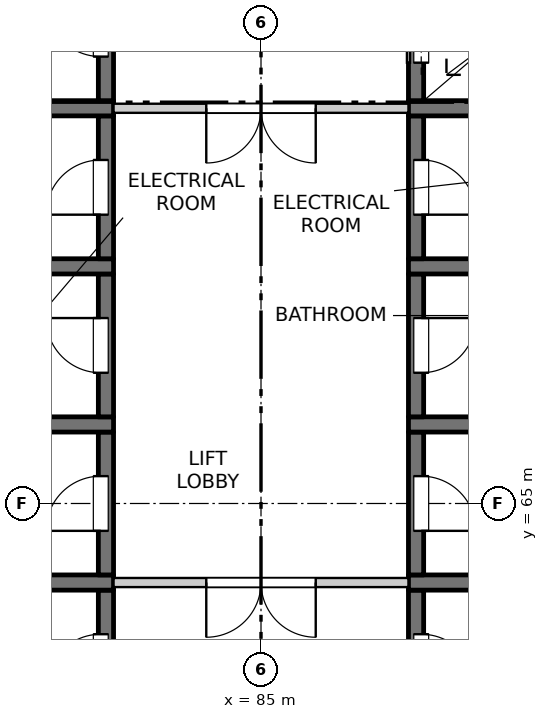
"""IFC4 building model, lengths in metres.
Left out: names, types, materials, properties, quantities, classifications, styles, units other than length and angle.
Written with IfcOpenShell. Run it as: python <this file> out.ifc"""

import sys

from ifc_helpers import new_model, si_unit, direction, frame, frame_2d, origin, place, context, subcontext, project, spatial, rectangle, extrude, element, fill, save


model = new_model("IFC4")
c1 = context("Model", 3, precision=1e-05, world=origin(), true_north=direction((0.0, 1.0)))
c2 = subcontext(c1, "Body", "Model", "MODEL_VIEW")
j1 = project(units=[si_unit("LENGTHUNIT", "METRE"), si_unit("PLANEANGLEUNIT", "RADIAN")], contexts=[c1])
p1 = place(None, origin())
s1 = spatial("IfcSite", under=j1, at=p1, CompositionType="ELEMENT")
p2 = place(p1, origin())
s2 = spatial("IfcBuilding", under=s1, at=p2, CompositionType="ELEMENT")
p3 = place(p2, frame((0.0, 0.0, 234.7)))
s3 = spatial("IfcBuildingStorey", under=s2, at=p3, CompositionType="ELEMENT", Elevation=234.7)
p4 = place(p3, frame((82.45, 61.225, -0.25), z_axis=(0.0, 0.0, 1.0), x_axis=(0.0, 1.0, 0.0)))
e1 = element("IfcWall", 1, at=p4, inside=s3, PredefinedType="SOLIDWALL", context=c2, shape_type="SweptSolid", body=[
    extrude(rectangle(XDim=2.35, YDim=0.25, at=frame_2d((1.175, 0.0))), origin(), (0.0, 0.0, 1.0), 3.4),
])
p5 = place(p4, frame((0.725, 0.0, 0.25)))
e2 = element("IfcOpeningElement", 2, at=p5, cuts=e1, PredefinedType="OPENING", context=c2, shape_type="SweptSolid", body=[
    extrude(rectangle(XDim=0.9, YDim=2.1, at=frame_2d((0.45, 1.05))), frame((0.0, 0.135, 0.0), z_axis=(0.0, -1.0, 0.0), x_axis=(1.0, 0.0, 0.0)), (0.0, 0.0, 1.0), 0.27),
])
p6 = place(p3, frame((79.575, 63.7, -0.25), z_axis=(0.0, 0.0, 1.0), x_axis=(1.0, 0.0, 0.0)))
e3 = element("IfcWall", 3, at=p6, inside=s3, PredefinedType="SOLIDWALL", context=c2, shape_type="SweptSolid", body=[
    extrude(rectangle(XDim=3.0, YDim=0.25, at=frame_2d((1.5, 0.0))), origin(), (0.0, 0.0, 1.0), 3.4),
])
p7 = place(p3, frame((82.45, 63.825, -0.25), z_axis=(0.0, 0.0, 1.0), x_axis=(0.0, 1.0, 0.0)))
e4 = element("IfcWall", 4, at=p7, inside=s3, PredefinedType="SOLIDWALL", context=c2, shape_type="SweptSolid", body=[
    extrude(rectangle(XDim=2.35, YDim=0.25, at=frame_2d((1.175, 0.0))), origin(), (0.0, 0.0, 1.0), 3.4),
])
p8 = place(p7, frame((0.725, 0.0, 0.25)))
e5 = element("IfcOpeningElement", 5, at=p8, cuts=e4, PredefinedType="OPENING", context=c2, shape_type="SweptSolid", body=[
    extrude(rectangle(XDim=0.9, YDim=2.1, at=frame_2d((0.45, 1.05))), frame((0.0, 0.135, 0.0), z_axis=(0.0, -1.0, 0.0), x_axis=(1.0, 0.0, 0.0)), (0.0, 0.0, 1.0), 0.27),
])
p9 = place(p3, frame((79.575, 66.3, -0.25), z_axis=(0.0, 0.0, 1.0), x_axis=(1.0, 0.0, 0.0)))
e6 = element("IfcWall", 6, at=p9, inside=s3, PredefinedType="SOLIDWALL", context=c2, shape_type="SweptSolid", body=[
    extrude(rectangle(XDim=3.0, YDim=0.25, at=frame_2d((1.5, 0.0))), origin(), (0.0, 0.0, 1.0), 3.4),
])
p10 = place(p3, frame((82.45, 66.425, -0.25), z_axis=(0.0, 0.0, 1.0), x_axis=(0.0, 1.0, 0.0)))
e7 = element("IfcWall", 7, at=p10, inside=s3, PredefinedType="SOLIDWALL", context=c2, shape_type="SweptSolid", body=[
    extrude(rectangle(XDim=2.35, YDim=0.25, at=frame_2d((1.175, 0.0))), origin(), (0.0, 0.0, 1.0), 3.4),
])
p11 = place(p10, frame((0.725, 0.0, 0.25)))
e8 = element("IfcOpeningElement", 8, at=p11, cuts=e7, PredefinedType="OPENING", context=c2, shape_type="SweptSolid", body=[
    extrude(rectangle(XDim=0.9, YDim=2.1, at=frame_2d((0.45, 1.05))), frame((0.0, 0.135, 0.0), z_axis=(0.0, -1.0, 0.0), x_axis=(1.0, 0.0, 0.0)), (0.0, 0.0, 1.0), 0.27),
])
p12 = place(p3, frame((79.575, 68.9, -0.25), z_axis=(0.0, 0.0, 1.0), x_axis=(1.0, 0.0, 0.0)))
e9 = element("IfcWall", 9, at=p12, inside=s3, PredefinedType="SOLIDWALL", context=c2, shape_type="SweptSolid", body=[
    extrude(rectangle(XDim=3.0, YDim=0.25, at=frame_2d((1.5, 0.0))), origin(), (0.0, 0.0, 1.0), 3.4),
])
p13 = place(p3, frame((82.45, 69.025, -0.25), z_axis=(0.0, 0.0, 1.0), x_axis=(0.0, 1.0, 0.0)))
e10 = element("IfcWall", 10, at=p13, inside=s3, PredefinedType="SOLIDWALL", context=c2, shape_type="SweptSolid", body=[
    extrude(rectangle(XDim=2.35, YDim=0.25, at=frame_2d((1.175, 0.0))), origin(), (0.0, 0.0, 1.0), 3.4),
])
p14 = place(p13, frame((0.725, 0.0, 0.25)))
e11 = element("IfcOpeningElement", 11, at=p14, cuts=e10, PredefinedType="OPENING", context=c2, shape_type="SweptSolid", body=[
    extrude(rectangle(XDim=0.9, YDim=2.1, at=frame_2d((0.45, 1.05))), frame((0.0, 0.135, 0.0), z_axis=(0.0, -1.0, 0.0), x_axis=(1.0, 0.0, 0.0)), (0.0, 0.0, 1.0), 0.27),
])
p15 = place(p3, frame((79.575, 71.5, -0.25), z_axis=(0.0, 0.0, 1.0), x_axis=(1.0, 0.0, 0.0)))
e12 = element("IfcWall", 12, at=p15, inside=s3, PredefinedType="SOLIDWALL", context=c2, shape_type="SweptSolid", body=[
    extrude(rectangle(XDim=3.0, YDim=0.25, at=frame_2d((1.5, 0.0))), origin(), (0.0, 0.0, 1.0), 3.4),
])
p16 = place(p3, frame((82.45, 71.625, -0.25), z_axis=(0.0, 0.0, 1.0), x_axis=(0.0, 1.0, 0.0)))
e13 = element("IfcWall", 13, at=p16, inside=s3, PredefinedType="SOLIDWALL", context=c2, shape_type="SweptSolid", body=[
    extrude(rectangle(XDim=2.35, YDim=0.25, at=frame_2d((1.175, 0.0))), origin(), (0.0, 0.0, 1.0), 3.4),
])
p17 = place(p16, frame((0.725, 0.0, 0.25)))
e14 = element("IfcOpeningElement", 14, at=p17, cuts=e13, PredefinedType="OPENING", context=c2, shape_type="SweptSolid", body=[
    extrude(rectangle(XDim=0.9, YDim=2.1, at=frame_2d((0.45, 1.05))), frame((0.0, 0.135, 0.0), z_axis=(0.0, -1.0, 0.0), x_axis=(1.0, 0.0, 0.0)), (0.0, 0.0, 1.0), 0.27),
])
p18 = place(p3, frame((87.55, 61.225, -0.25), z_axis=(0.0, 0.0, 1.0), x_axis=(0.0, 1.0, 0.0)))
e15 = element("IfcWall", 15, at=p18, inside=s3, PredefinedType="SOLIDWALL", context=c2, shape_type="SweptSolid", body=[
    extrude(rectangle(XDim=2.35, YDim=0.25, at=frame_2d((1.175, 0.0))), origin(), (0.0, 0.0, 1.0), 3.4),
])
p19 = place(p18, frame((0.725, 0.0, 0.25)))
e16 = element("IfcOpeningElement", 16, at=p19, cuts=e15, PredefinedType="OPENING", context=c2, shape_type="SweptSolid", body=[
    extrude(rectangle(XDim=0.9, YDim=2.1, at=frame_2d((0.45, 1.05))), frame((0.0, 0.135, 0.0), z_axis=(0.0, -1.0, 0.0), x_axis=(1.0, 0.0, 0.0)), (0.0, 0.0, 1.0), 0.27),
])
p20 = place(p3, frame((87.425, 63.7, -0.25), z_axis=(0.0, 0.0, 1.0), x_axis=(1.0, 0.0, 0.0)))
e17 = element("IfcWall", 17, at=p20, inside=s3, PredefinedType="SOLIDWALL", context=c2, shape_type="SweptSolid", body=[
    extrude(rectangle(XDim=3.0, YDim=0.25, at=frame_2d((1.5, 0.0))), origin(), (0.0, 0.0, 1.0), 3.4),
])
p21 = place(p3, frame((87.55, 63.825, -0.25), z_axis=(0.0, 0.0, 1.0), x_axis=(0.0, 1.0, 0.0)))
e18 = element("IfcWall", 18, at=p21, inside=s3, PredefinedType="SOLIDWALL", context=c2, shape_type="SweptSolid", body=[
    extrude(rectangle(XDim=2.35, YDim=0.25, at=frame_2d((1.175, 0.0))), origin(), (0.0, 0.0, 1.0), 3.4),
])
p22 = place(p21, frame((0.725, 0.0, 0.25)))
e19 = element("IfcOpeningElement", 19, at=p22, cuts=e18, PredefinedType="OPENING", context=c2, shape_type="SweptSolid", body=[
    extrude(rectangle(XDim=0.9, YDim=2.1, at=frame_2d((0.45, 1.05))), frame((0.0, 0.135, 0.0), z_axis=(0.0, -1.0, 0.0), x_axis=(1.0, 0.0, 0.0)), (0.0, 0.0, 1.0), 0.27),
])
p23 = place(p3, frame((87.425, 66.3, -0.25), z_axis=(0.0, 0.0, 1.0), x_axis=(1.0, 0.0, 0.0)))
e20 = element("IfcWall", 20, at=p23, inside=s3, PredefinedType="SOLIDWALL", context=c2, shape_type="SweptSolid", body=[
    extrude(rectangle(XDim=3.0, YDim=0.25, at=frame_2d((1.5, 0.0))), origin(), (0.0, 0.0, 1.0), 3.4),
])
p24 = place(p3, frame((87.55, 66.425, -0.25), z_axis=(0.0, 0.0, 1.0), x_axis=(0.0, 1.0, 0.0)))
e21 = element("IfcWall", 21, at=p24, inside=s3, PredefinedType="SOLIDWALL", context=c2, shape_type="SweptSolid", body=[
    extrude(rectangle(XDim=2.35, YDim=0.25, at=frame_2d((1.175, 0.0))), origin(), (0.0, 0.0, 1.0), 3.4),
])
p25 = place(p24, frame((0.725, 0.0, 0.25)))
e22 = element("IfcOpeningElement", 22, at=p25, cuts=e21, PredefinedType="OPENING", context=c2, shape_type="SweptSolid", body=[
    extrude(rectangle(XDim=0.9, YDim=2.1, at=frame_2d((0.45, 1.05))), frame((0.0, 0.135, 0.0), z_axis=(0.0, -1.0, 0.0), x_axis=(1.0, 0.0, 0.0)), (0.0, 0.0, 1.0), 0.27),
])
p26 = place(p3, frame((87.425, 68.9, -0.25), z_axis=(0.0, 0.0, 1.0), x_axis=(1.0, 0.0, 0.0)))
e23 = element("IfcWall", 23, at=p26, inside=s3, PredefinedType="SOLIDWALL", context=c2, shape_type="SweptSolid", body=[
    extrude(rectangle(XDim=3.0, YDim=0.25, at=frame_2d((1.5, 0.0))), origin(), (0.0, 0.0, 1.0), 3.4),
])
p27 = place(p3, frame((87.55, 69.025, -0.25), z_axis=(0.0, 0.0, 1.0), x_axis=(0.0, 1.0, 0.0)))
e24 = element("IfcWall", 24, at=p27, inside=s3, PredefinedType="SOLIDWALL", context=c2, shape_type="SweptSolid", body=[
    extrude(rectangle(XDim=2.35, YDim=0.25, at=frame_2d((1.175, 0.0))), origin(), (0.0, 0.0, 1.0), 3.4),
])
p28 = place(p27, frame((0.725, 0.0, 0.25)))
e25 = element("IfcOpeningElement", 25, at=p28, cuts=e24, PredefinedType="OPENING", context=c2, shape_type="SweptSolid", body=[
    extrude(rectangle(XDim=0.9, YDim=2.1, at=frame_2d((0.45, 1.05))), frame((0.0, 0.135, 0.0), z_axis=(0.0, -1.0, 0.0), x_axis=(1.0, 0.0, 0.0)), (0.0, 0.0, 1.0), 0.27),
])
p29 = place(p3, frame((87.425, 71.5, -0.25), z_axis=(0.0, 0.0, 1.0), x_axis=(1.0, 0.0, 0.0)))
e26 = element("IfcWall", 26, at=p29, inside=s3, PredefinedType="SOLIDWALL", context=c2, shape_type="SweptSolid", body=[
    extrude(rectangle(XDim=3.0, YDim=0.25, at=frame_2d((1.5, 0.0))), origin(), (0.0, 0.0, 1.0), 3.4),
])
p30 = place(p3, frame((87.55, 71.625, -0.25), z_axis=(0.0, 0.0, 1.0), x_axis=(0.0, 1.0, 0.0)))
e27 = element("IfcWall", 27, at=p30, inside=s3, PredefinedType="SOLIDWALL", context=c2, shape_type="SweptSolid", body=[
    extrude(rectangle(XDim=2.35, YDim=0.25, at=frame_2d((1.175, 0.0))), origin(), (0.0, 0.0, 1.0), 3.4),
])
p31 = place(p30, frame((0.625, 0.0, 0.25)))
e28 = element("IfcOpeningElement", 28, at=p31, cuts=e27, PredefinedType="OPENING", context=c2, shape_type="SweptSolid", body=[
    extrude(rectangle(XDim=1.1, YDim=2.1, at=frame_2d((0.55, 1.05))), frame((0.0, 0.135, 0.0), z_axis=(0.0, -1.0, 0.0), x_axis=(1.0, 0.0, 0.0)), (0.0, 0.0, 1.0), 0.27),
])
p32 = place(p3, frame((82.575, 63.7, 0.0), z_axis=(0.0, 0.0, 1.0), x_axis=(1.0, 0.0, 0.0)))
e29 = element("IfcWall", 29, at=p32, inside=s3, PredefinedType="PARTITIONING", context=c2, shape_type="SweptSolid", body=[
    extrude(rectangle(XDim=4.85, YDim=0.15, at=frame_2d((2.425, 0.0))), origin(), (0.0, 0.0, 1.0), 3.15),
])
p33 = place(p32, frame((1.525, 0.0, 0.0)))
e30 = element("IfcOpeningElement", 30, at=p33, cuts=e29, PredefinedType="OPENING", context=c2, shape_type="SweptSolid", body=[
    extrude(rectangle(XDim=1.8, YDim=2.1, at=frame_2d((0.9, 1.05))), frame((0.0, 0.085, 0.0), z_axis=(0.0, -1.0, 0.0), x_axis=(1.0, 0.0, 0.0)), (0.0, 0.0, 1.0), 0.17),
])
p34 = place(p3, frame((82.575, 71.5, 0.0), z_axis=(0.0, 0.0, 1.0), x_axis=(1.0, 0.0, 0.0)))
e31 = element("IfcWall", 31, at=p34, inside=s3, PredefinedType="PARTITIONING", context=c2, shape_type="SweptSolid", body=[
    extrude(rectangle(XDim=4.85, YDim=0.15, at=frame_2d((2.425, 0.0))), origin(), (0.0, 0.0, 1.0), 3.15),
])
p35 = place(p34, frame((1.525, 0.0, 0.0)))
e32 = element("IfcOpeningElement", 32, at=p35, cuts=e31, PredefinedType="OPENING", context=c2, shape_type="SweptSolid", body=[
    extrude(rectangle(XDim=1.8, YDim=2.1, at=frame_2d((0.9, 1.05))), frame((0.0, 0.085, 0.0), z_axis=(0.0, -1.0, 0.0), x_axis=(1.0, 0.0, 0.0)), (0.0, 0.0, 1.0), 0.17),
])
p36 = place(p5, origin())
e33 = element("IfcDoor", 33, at=p36, inside=s3, OperationType="SINGLE_SWING_LEFT", PredefinedType="DOOR", context=c2, shape_type="SweptSolid", body=[
    extrude(rectangle(XDim=0.9, YDim=2.1, at=frame_2d((0.45, 1.05))), frame((0.0, 0.11, 0.0), z_axis=(0.0, -1.0, 0.0), x_axis=(1.0, 0.0, 0.0)), (0.0, 0.0, 1.0), 0.05),
])
fill(e2, e33)
p37 = place(p19, origin())
e34 = element("IfcDoor", 34, at=p37, inside=s3, OperationType="SINGLE_SWING_RIGHT", PredefinedType="DOOR", context=c2, shape_type="SweptSolid", body=[
    extrude(rectangle(XDim=0.9, YDim=2.1, at=frame_2d((0.45, 1.05))), frame((0.0, -0.06, 0.0), z_axis=(0.0, -1.0, 0.0), x_axis=(1.0, 0.0, 0.0)), (0.0, 0.0, 1.0), 0.05),
])
fill(e16, e34)
p38 = place(p33, origin())
e35 = element("IfcDoor", 35, at=p38, inside=s3, OperationType="DOUBLE_DOOR_SINGLE_SWING", PredefinedType="DOOR", context=c2, shape_type="SweptSolid", body=[
    extrude(rectangle(XDim=1.8, YDim=2.1, at=frame_2d((0.9, 1.05))), frame((0.0, 0.025, 0.0), z_axis=(0.0, -1.0, 0.0), x_axis=(1.0, 0.0, 0.0)), (0.0, 0.0, 1.0), 0.05),
])
fill(e30, e35)
p39 = place(p8, origin())
e36 = element("IfcDoor", 36, at=p39, inside=s3, OperationType="SINGLE_SWING_LEFT", PredefinedType="DOOR", context=c2, shape_type="SweptSolid", body=[
    extrude(rectangle(XDim=0.9, YDim=2.1, at=frame_2d((0.45, 1.05))), frame((0.0, 0.11, 0.0), z_axis=(0.0, -1.0, 0.0), x_axis=(1.0, 0.0, 0.0)), (0.0, 0.0, 1.0), 0.05),
])
fill(e5, e36)
p40 = place(p22, origin())
e37 = element("IfcDoor", 37, at=p40, inside=s3, OperationType="SINGLE_SWING_RIGHT", PredefinedType="DOOR", context=c2, shape_type="SweptSolid", body=[
    extrude(rectangle(XDim=0.9, YDim=2.1, at=frame_2d((0.45, 1.05))), frame((0.0, -0.06, 0.0), z_axis=(0.0, -1.0, 0.0), x_axis=(1.0, 0.0, 0.0)), (0.0, 0.0, 1.0), 0.05),
])
fill(e19, e37)
p41 = place(p11, origin())
e38 = element("IfcDoor", 38, at=p41, inside=s3, OperationType="SINGLE_SWING_RIGHT", PredefinedType="DOOR", context=c2, shape_type="SweptSolid", body=[
    extrude(rectangle(XDim=0.9, YDim=2.1, at=frame_2d((0.45, 1.05))), frame((0.0, 0.11, 0.0), z_axis=(0.0, -1.0, 0.0), x_axis=(1.0, 0.0, 0.0)), (0.0, 0.0, 1.0), 0.05),
])
fill(e8, e38)
p42 = place(p25, origin())
e39 = element("IfcDoor", 39, at=p42, inside=s3, OperationType="SINGLE_SWING_LEFT", PredefinedType="DOOR", context=c2, shape_type="SweptSolid", body=[
    extrude(rectangle(XDim=0.9, YDim=2.1, at=frame_2d((0.45, 1.05))), frame((0.0, -0.06, 0.0), z_axis=(0.0, -1.0, 0.0), x_axis=(1.0, 0.0, 0.0)), (0.0, 0.0, 1.0), 0.05),
])
fill(e22, e39)
p43 = place(p14, origin())
e40 = element("IfcDoor", 40, at=p43, inside=s3, OperationType="SINGLE_SWING_LEFT", PredefinedType="DOOR", context=c2, shape_type="SweptSolid", body=[
    extrude(rectangle(XDim=0.9, YDim=2.1, at=frame_2d((0.45, 1.05))), frame((0.0, 0.11, 0.0), z_axis=(0.0, -1.0, 0.0), x_axis=(1.0, 0.0, 0.0)), (0.0, 0.0, 1.0), 0.05),
])
fill(e11, e40)
p44 = place(p28, origin())
e41 = element("IfcDoor", 41, at=p44, inside=s3, OperationType="SINGLE_SWING_RIGHT", PredefinedType="DOOR", context=c2, shape_type="SweptSolid", body=[
    extrude(rectangle(XDim=0.9, YDim=2.1, at=frame_2d((0.45, 1.05))), frame((0.0, -0.06, 0.0), z_axis=(0.0, -1.0, 0.0), x_axis=(1.0, 0.0, 0.0)), (0.0, 0.0, 1.0), 0.05),
])
fill(e25, e41)
p45 = place(p35, origin())
e42 = element("IfcDoor", 42, at=p45, inside=s3, OperationType="DOUBLE_DOOR_SINGLE_SWING", PredefinedType="DOOR", context=c2, shape_type="SweptSolid", body=[
    extrude(rectangle(XDim=1.8, YDim=2.1, at=frame_2d((0.9, 1.05))), frame((0.0, 0.025, 0.0), z_axis=(0.0, -1.0, 0.0), x_axis=(1.0, 0.0, 0.0)), (0.0, 0.0, 1.0), 0.05),
])
fill(e32, e42)
p46 = place(p17, origin())
e43 = element("IfcDoor", 43, at=p46, inside=s3, OperationType="SINGLE_SWING_RIGHT", PredefinedType="DOOR", context=c2, shape_type="SweptSolid", body=[
    extrude(rectangle(XDim=0.9, YDim=2.1, at=frame_2d((0.45, 1.05))), frame((0.0, 0.11, 0.0), z_axis=(0.0, -1.0, 0.0), x_axis=(1.0, 0.0, 0.0)), (0.0, 0.0, 1.0), 0.05),
])
fill(e14, e43)
p47 = place(p31, origin())
e44 = element("IfcDoor", 44, at=p47, inside=s3, OperationType="SLIDING_TO_LEFT", PredefinedType="DOOR", context=c2, shape_type="SweptSolid", body=[
    extrude(rectangle(XDim=1.1, YDim=2.1, at=frame_2d((0.55, 1.05))), frame((0.0, -0.06, 0.0), z_axis=(0.0, -1.0, 0.0), x_axis=(1.0, 0.0, 0.0)), (0.0, 0.0, 1.0), 0.05),
])
fill(e28, e44)
save(model, sys.argv[1])
